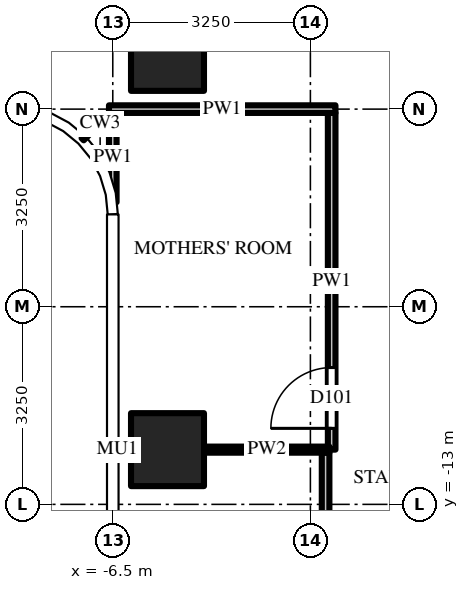
"""IFC4 building model, lengths in metres.
Left out: names, types, materials, properties, quantities, classifications, styles, units other than length and angle.
Written with IfcOpenShell. Run it as: python <this file> out.ifc"""

import sys

from ifc_helpers import new_model, si_unit, direction, frame, frame_2d, origin, origin_2d, place, context, subcontext, project, spatial, rectangle, extrude, source, transform, mapped, element, fill, save


model = new_model("IFC4")
c1 = context("Model", 3, precision=1e-05, world=origin(), true_north=direction((0.0, 1.0)))
c2 = subcontext(c1, "Body", "Model", "MODEL_VIEW")
j1 = project(units=[si_unit("LENGTHUNIT", "METRE"), si_unit("PLANEANGLEUNIT", "RADIAN")], contexts=[c1])
p1 = place(None, origin())
s1 = spatial("IfcSite", under=j1, at=p1, CompositionType="ELEMENT")
p2 = place(p1, origin())
s2 = spatial("IfcBuilding", under=s1, at=p2, CompositionType="ELEMENT")
p3 = place(p2, frame((0.0, 0.0, 189.3)))
s3 = spatial("IfcBuildingStorey", under=s2, at=p3, CompositionType="ELEMENT", Elevation=189.3)
m1 = source(origin(), c2, "Body", "SweptSolid", [
    extrude(rectangle(XDim=1.2, YDim=1.2, at=origin_2d()), origin(), (0.0, 0.0, 1.0), 3.9),
])
for number, where, z_axis, x_axis in (
    (1, (-5.6, -5.6, 0.0), (0.0, 0.0, 1.0), (1.0, 0.0, 0.0)),
    (2, (-5.6, -12.1, 0.0), (0.0, 0.0, 1.0), (1.0, 0.0, 0.0)),
):
    element("IfcColumn", number, at=place(p3, frame(where, z_axis=z_axis, x_axis=x_axis)), inside=s3, PredefinedType="COLUMN", context=c2, shape_type="MappedRepresentation", body=[
        mapped(m1, transform((0.0, 0.0, 0.0))),
    ])
m2 = source(origin(), c2, "Body", "SweptSolid", [
    extrude(rectangle(XDim=1.469, YDim=0.125, at=frame_2d((0.734, 0.0))), origin(), (0.0, 0.0, 1.0), 3.7),
])
p4 = place(p3, frame((-6.5, -6.562, 0.0), z_axis=(0.0, 0.0, 1.0), x_axis=(0.0, -1.0, 0.0)))
e3 = element("IfcWall", 3, at=p4, inside=s3, PredefinedType="PARTITIONING", context=c2, shape_type="MappedRepresentation", body=[
    mapped(m2, transform((0.0, 0.0, 0.0))),
])
m3 = source(origin(), c2, "Body", "SweptSolid", [
    extrude(rectangle(XDim=8.85, YDim=0.125, at=frame_2d((4.425, 0.0))), origin(), (0.0, 0.0, 1.0), 2.996),
])
p5 = place(p3, frame((-3.0, -21.0, 0.0), z_axis=(0.0, 0.0, 1.0), x_axis=(0.0, 1.0, 0.0)))
e4 = element("IfcWall", 4, at=p5, inside=s3, PredefinedType="PARTITIONING", context=c2, shape_type="MappedRepresentation", body=[
    mapped(m3, transform((0.0, 0.0, 0.0))),
])
m4 = source(origin(), c2, "Body", "SweptSolid", [
    extrude(rectangle(XDim=1.8, YDim=2.1, at=frame_2d((0.9, 1.05))), frame((0.0, 0.073, 0.0), z_axis=(0.0, -1.0, 0.0), x_axis=(1.0, 0.0, 0.0)), (0.0, 0.0, 1.0), 0.145),
])
p6 = place(p5, frame((5.35, 0.0, 0.0)))
e5 = element("IfcOpeningElement", 5, at=p6, cuts=e4, PredefinedType="OPENING", context=c2, shape_type="MappedRepresentation", body=[
    mapped(m4, transform((0.0, 0.0, 0.0))),
])
m5 = source(origin(), c2, "Body", "SweptSolid", [
    extrude(rectangle(XDim=5.538, YDim=0.125, at=frame_2d((2.769, 0.0))), origin(), (0.0, 0.0, 1.0), 2.996),
])
p7 = place(p3, frame((-2.9, -12.1, 0.0), z_axis=(0.0, 0.0, 1.0), x_axis=(0.0, 1.0, 0.0)))
e6 = element("IfcWall", 6, at=p7, inside=s3, PredefinedType="PARTITIONING", context=c2, shape_type="MappedRepresentation", body=[
    mapped(m5, transform((0.0, 0.0, 0.0))),
])
m6 = source(origin(), c2, "Body", "SweptSolid", [
    extrude(rectangle(XDim=1.0, YDim=2.1, at=frame_2d((0.5, 1.05))), frame((0.0, 0.073, 0.0), z_axis=(0.0, -1.0, 0.0), x_axis=(1.0, 0.0, 0.0)), (0.0, 0.0, 1.0), 0.145),
])
p8 = place(p7, frame((0.35, 0.0, 0.0)))
e7 = element("IfcOpeningElement", 7, at=p8, cuts=e6, PredefinedType="OPENING", context=c2, shape_type="MappedRepresentation", body=[
    mapped(m6, transform((0.0, 0.0, 0.0))),
])
m7 = source(origin(), c2, "Body", "SweptSolid", [
    extrude(rectangle(XDim=2.062, YDim=0.1, at=frame_2d((1.031, 0.0))), origin(), (0.0, 0.0, 1.0), 2.996),
])
p9 = place(p3, frame((-5.0, -12.1, 0.0), z_axis=(0.0, 0.0, 1.0), x_axis=(1.0, 0.0, 0.0)))
e8 = element("IfcWall", 8, at=p9, inside=s3, PredefinedType="PARTITIONING", context=c2, shape_type="MappedRepresentation", body=[
    mapped(m7, transform((0.0, 0.0, 0.0))),
])
m8 = source(origin(), c2, "Body", "SweptSolid", [
    extrude(rectangle(XDim=3.725, YDim=0.125, at=frame_2d((1.863, 0.0))), origin(), (0.0, 0.0, 1.0), 2.78),
])
p10 = place(p3, frame((-2.837, -6.5, 0.0), z_axis=(0.0, 0.0, 1.0), x_axis=(-1.0, 0.0, 0.0)))
e9 = element("IfcWall", 9, at=p10, inside=s3, PredefinedType="PARTITIONING", context=c2, shape_type="MappedRepresentation", body=[
    mapped(m8, transform((0.0, 0.0, 0.0))),
])
m9 = source(origin(), c2, "Body", "SweptSolid", [
    extrude(rectangle(XDim=1.0, YDim=2.1, at=frame_2d((0.5, 1.05))), frame((0.0, 0.025, 0.0), z_axis=(0.0, -1.0, 0.0), x_axis=(1.0, 0.0, 0.0)), (0.0, 0.0, 1.0), 0.05),
])
p11 = place(p8, origin())
e10 = element("IfcDoor", 10, at=p11, inside=s3, OperationType="SINGLE_SWING_LEFT", PredefinedType="DOOR", context=c2, shape_type="MappedRepresentation", body=[
    mapped(m9, transform((0.0, 0.0, 0.0))),
])
fill(e7, e10)
save(model, sys.argv[1])
